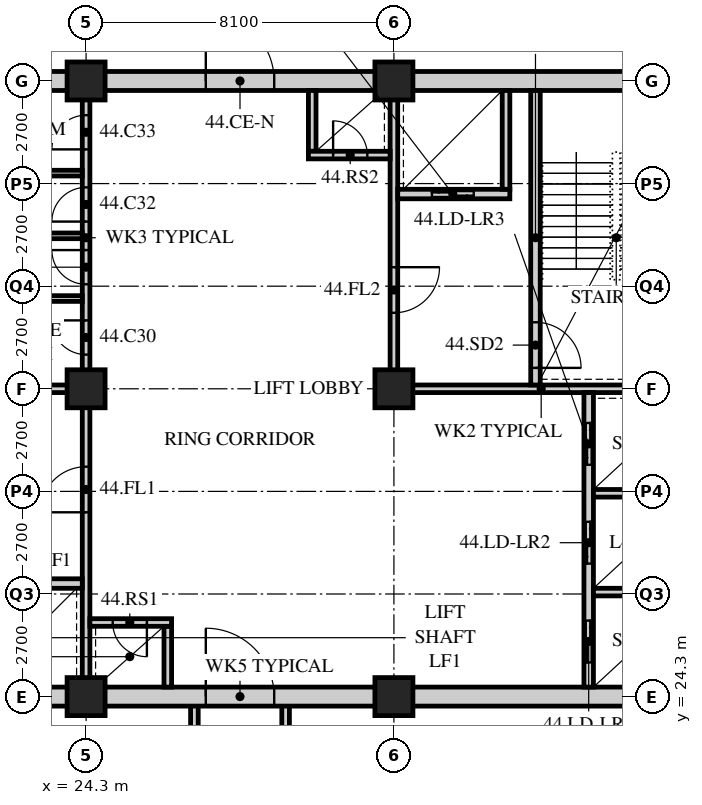
"""IFC4 building model, lengths in metres.
Left out: names, types, materials, properties, quantities, classifications, styles, units other than length and angle.
Written with IfcOpenShell. Run it as: python <this file> out.ifc"""

import sys

from ifc_helpers import new_model, si_unit, direction, frame, frame_2d, origin, origin_2d, place, context, subcontext, project, spatial, rectangle, hollow_rectangle, extrude, element, fill, save


model = new_model("IFC4")
c1 = context("Model", 3, precision=1e-05, world=origin(), true_north=direction((0.0, 1.0)))
c2 = subcontext(c1, "Body", "Model", "MODEL_VIEW")
j1 = project(units=[si_unit("LENGTHUNIT", "METRE"), si_unit("PLANEANGLEUNIT", "RADIAN")], contexts=[c1])
p1 = place(None, origin())
s1 = spatial("IfcSite", under=j1, at=p1, CompositionType="ELEMENT")
p2 = place(p1, origin())
s2 = spatial("IfcBuilding", under=s1, at=p2, CompositionType="ELEMENT")
p3 = place(p2, frame((0.0, 0.0, 174.0)))
s3 = spatial("IfcBuildingStorey", under=s2, at=p3, CompositionType="ELEMENT", Elevation=174.0)
for number, where, z_axis, x_axis in (
    (1, (24.3, 24.3, 0.0), (0.0, 0.0, 1.0), (1.0, 0.0, 0.0)),
    (2, (24.3, 32.4, 0.0), (0.0, 0.0, 1.0), (1.0, 0.0, 0.0)),
    (3, (24.3, 40.5, 0.0), (0.0, 0.0, 1.0), (1.0, 0.0, 0.0)),
    (4, (32.4, 24.3, 0.0), (0.0, 0.0, 1.0), (1.0, 0.0, 0.0)),
    (5, (32.4, 32.4, 0.0), (0.0, 0.0, 1.0), (1.0, 0.0, 0.0)),
    (6, (32.4, 40.5, 0.0), (0.0, 0.0, 1.0), (1.0, 0.0, 0.0)),
):
    element("IfcColumn", number, at=place(p3, frame(where, z_axis=z_axis, x_axis=x_axis)), inside=s3, PredefinedType="COLUMN", context=c2, shape_type="SweptSolid", body=[
        extrude(hollow_rectangle(XDim=1.0, YDim=1.0, WallThickness=0.1, at=origin_2d()), origin(), (0.0, 0.0, 1.0), 3.6),
    ])
for number, where, z_axis, x_axis in (
    (7, (27.15, 20.7, 0.0), (0.0, 0.0, 1.0), (0.0, 1.0, 0.0)),
    (8, (29.55, 20.7, 0.0), (0.0, 0.0, 1.0), (0.0, 1.0, 0.0)),
):
    element("IfcWall", number, at=place(p3, frame(where, z_axis=z_axis, x_axis=x_axis)), inside=s3, PredefinedType="SOLIDWALL", context=c2, shape_type="SweptSolid", body=[
        extrude(rectangle(XDim=3.6, YDim=0.2, at=frame_2d((1.8, 0.0))), origin(), (0.0, 0.0, 1.0), 3.39),
    ])
p4 = place(p3, frame((15.95, 24.3, 0.0), z_axis=(0.0, 0.0, 1.0), x_axis=(1.0, 0.0, 0.0)))
e9 = element("IfcWall", 9, at=p4, inside=s3, PredefinedType="SOLIDWALL", context=c2, shape_type="SweptSolid", body=[
    extrude(rectangle(XDim=24.8, YDim=0.5, at=frame_2d((12.4, 0.0))), origin(), (0.0, 0.0, 1.0), 2.74),
])
p5 = place(p4, frame((11.5, 0.0, 0.0)))
e10 = element("IfcOpeningElement", 10, at=p5, cuts=e9, PredefinedType="OPENING", context=c2, shape_type="SweptSolid", body=[
    extrude(rectangle(XDim=1.8, YDim=2.4, at=frame_2d((0.9, 1.2))), frame((0.0, 0.26, 0.0), z_axis=(0.0, -1.0, 0.0), x_axis=(1.0, 0.0, 0.0)), (0.0, 0.0, 1.0), 0.52),
])
p6 = place(p3, frame((15.95, 40.5, 0.0), z_axis=(0.0, 0.0, 1.0), x_axis=(1.0, 0.0, 0.0)))
e11 = element("IfcWall", 11, at=p6, inside=s3, PredefinedType="SOLIDWALL", context=c2, shape_type="SweptSolid", body=[
    extrude(rectangle(XDim=24.8, YDim=0.5, at=frame_2d((12.4, 0.0))), origin(), (0.0, 0.0, 1.0), 2.74),
])
p7 = place(p6, frame((11.5, 0.0, 0.0)))
e12 = element("IfcOpeningElement", 12, at=p7, cuts=e11, PredefinedType="OPENING", context=c2, shape_type="SweptSolid", body=[
    extrude(rectangle(XDim=1.8, YDim=2.4, at=frame_2d((0.9, 1.2))), frame((0.0, 0.26, 0.0), z_axis=(0.0, -1.0, 0.0), x_axis=(1.0, 0.0, 0.0)), (0.0, 0.0, 1.0), 0.52),
])
p8 = place(p3, frame((16.45, 32.4, 0.0), z_axis=(0.0, 0.0, 1.0), x_axis=(1.0, 0.0, 0.0)))
e13 = element("IfcWall", 13, at=p8, inside=s3, PredefinedType="SOLIDWALL", context=c2, shape_type="SweptSolid", body=[
    extrude(rectangle(XDim=7.95, YDim=0.2, at=frame_2d((3.975, 0.0))), origin(), (0.0, 0.0, 1.0), 2.778),
])
p9 = place(p3, frame((24.3, 24.55, 0.0), z_axis=(0.0, 0.0, 1.0), x_axis=(0.0, 1.0, 0.0)))
e14 = element("IfcWall", 14, at=p9, inside=s3, PredefinedType="SOLIDWALL", context=c2, shape_type="SweptSolid", body=[
    extrude(rectangle(XDim=7.75, YDim=0.2, at=frame_2d((3.875, 0.0))), origin(), (0.0, 0.0, 1.0), 2.778),
])
p10 = place(p9, frame((4.6, 0.0, 0.0)))
e15 = element("IfcOpeningElement", 15, at=p10, cuts=e14, PredefinedType="OPENING", context=c2, shape_type="SweptSolid", body=[
    extrude(rectangle(XDim=1.2, YDim=2.1, at=frame_2d((0.6, 1.05))), frame((0.0, 0.11, 0.0), z_axis=(0.0, -1.0, 0.0), x_axis=(1.0, 0.0, 0.0)), (0.0, 0.0, 1.0), 0.22),
])
p11 = place(p3, frame((21.25, 27.275, 0.0), z_axis=(0.0, 0.0, 1.0), x_axis=(1.0, 0.0, 0.0)))
e16 = element("IfcWall", 16, at=p11, inside=s3, PredefinedType="SOLIDWALL", context=c2, shape_type="SweptSolid", body=[
    extrude(rectangle(XDim=2.95, YDim=0.25, at=frame_2d((1.475, 0.0))), origin(), (0.0, 0.0, 1.0), 3.39),
])
p12 = place(p11, frame((0.95, 0.0, 0.0)))
e17 = element("IfcOpeningElement", 17, at=p12, cuts=e16, PredefinedType="OPENING", context=c2, shape_type="SweptSolid", body=[
    extrude(rectangle(XDim=1.1, YDim=2.4, at=frame_2d((0.55, 1.2))), frame((0.0, 0.135, 0.0), z_axis=(0.0, -1.0, 0.0), x_axis=(1.0, 0.0, 0.0)), (0.0, 0.0, 1.0), 0.27),
])
p13 = place(p3, frame((26.45, 24.55, 0.0), z_axis=(0.0, 0.0, 1.0), x_axis=(0.0, 1.0, 0.0)))
e18 = element("IfcWall", 18, at=p13, inside=s3, PredefinedType="SOLIDWALL", context=c2, shape_type="SweptSolid", body=[
    extrude(rectangle(XDim=1.6, YDim=0.2, at=frame_2d((0.8, 0.0))), origin(), (0.0, 0.0, 1.0), 3.39),
])
p14 = place(p3, frame((24.4, 26.25, 0.0), z_axis=(0.0, 0.0, 1.0), x_axis=(1.0, 0.0, 0.0)))
e19 = element("IfcWall", 19, at=p14, inside=s3, PredefinedType="SOLIDWALL", context=c2, shape_type="SweptSolid", body=[
    extrude(rectangle(XDim=2.15, YDim=0.2, at=frame_2d((1.075, 0.0))), origin(), (0.0, 0.0, 1.0), 3.39),
])
p15 = place(p14, frame((0.6, 0.0, 0.0)))
e20 = element("IfcOpeningElement", 20, at=p15, cuts=e19, PredefinedType="OPENING", context=c2, shape_type="SweptSolid", body=[
    extrude(rectangle(XDim=0.9, YDim=2.1, at=frame_2d((0.45, 1.05))), frame((0.0, 0.11, 0.0), z_axis=(0.0, -1.0, 0.0), x_axis=(1.0, 0.0, 0.0)), (0.0, 0.0, 1.0), 0.22),
])
p16 = place(p3, frame((32.3, 32.4, 0.0), z_axis=(0.0, 0.0, 1.0), x_axis=(1.0, 0.0, 0.0)))
e21 = element("IfcWall", 21, at=p16, inside=s3, PredefinedType="SOLIDWALL", context=c2, shape_type="SweptSolid", body=[
    extrude(rectangle(XDim=7.95, YDim=0.2, at=frame_2d((3.975, 0.0))), origin(), (0.0, 0.0, 1.0), 2.778),
])
p17 = place(p3, frame((32.4, 32.5, 0.0), z_axis=(0.0, 0.0, 1.0), x_axis=(0.0, 1.0, 0.0)))
e22 = element("IfcWall", 22, at=p17, inside=s3, PredefinedType="SOLIDWALL", context=c2, shape_type="SweptSolid", body=[
    extrude(rectangle(XDim=7.75, YDim=0.2, at=frame_2d((3.875, 0.0))), origin(), (0.0, 0.0, 1.0), 2.778),
])
p18 = place(p17, frame((1.9, 0.0, 0.0)))
e23 = element("IfcOpeningElement", 23, at=p18, cuts=e22, PredefinedType="OPENING", context=c2, shape_type="SweptSolid", body=[
    extrude(rectangle(XDim=1.2, YDim=2.1, at=frame_2d((0.6, 1.05))), frame((0.0, 0.11, 0.0), z_axis=(0.0, -1.0, 0.0), x_axis=(1.0, 0.0, 0.0)), (0.0, 0.0, 1.0), 0.22),
])
p19 = place(p3, frame((37.525, 24.55, 0.0), z_axis=(0.0, 0.0, 1.0), x_axis=(0.0, 1.0, 0.0)))
e24 = element("IfcWall", 24, at=p19, inside=s3, PredefinedType="SOLIDWALL", context=c2, shape_type="SweptSolid", body=[
    extrude(rectangle(XDim=7.75, YDim=0.25, at=frame_2d((3.875, 0.0))), origin(), (0.0, 0.0, 1.0), 3.39),
])
p20 = place(p19, frame((0.65, 0.0, 0.0)))
e25 = element("IfcOpeningElement", 25, at=p20, cuts=e24, PredefinedType="OPENING", context=c2, shape_type="SweptSolid", body=[
    extrude(rectangle(XDim=1.1, YDim=2.4, at=frame_2d((0.55, 1.2))), frame((0.0, 0.135, 0.0), z_axis=(0.0, -1.0, 0.0), x_axis=(1.0, 0.0, 0.0)), (0.0, 0.0, 1.0), 0.27),
])
p21 = place(p19, frame((3.25, 0.0, 0.0)))
e26 = element("IfcOpeningElement", 26, at=p21, cuts=e24, PredefinedType="OPENING", context=c2, shape_type="SweptSolid", body=[
    extrude(rectangle(XDim=1.1, YDim=2.4, at=frame_2d((0.55, 1.2))), frame((0.0, 0.135, 0.0), z_axis=(0.0, -1.0, 0.0), x_axis=(1.0, 0.0, 0.0)), (0.0, 0.0, 1.0), 0.27),
])
p22 = place(p19, frame((5.85, 0.0, 0.0)))
e27 = element("IfcOpeningElement", 27, at=p22, cuts=e24, PredefinedType="OPENING", context=c2, shape_type="SweptSolid", body=[
    extrude(rectangle(XDim=1.1, YDim=2.4, at=frame_2d((0.55, 1.2))), frame((0.0, 0.135, 0.0), z_axis=(0.0, -1.0, 0.0), x_axis=(1.0, 0.0, 0.0)), (0.0, 0.0, 1.0), 0.27),
])
for number, where, z_axis, x_axis in (
    (28, (37.65, 27.05, 0.0), (0.0, 0.0, 1.0), (1.0, 0.0, 0.0)),
    (29, (37.65, 29.65, 0.0), (0.0, 0.0, 1.0), (1.0, 0.0, 0.0)),
):
    element("IfcWall", number, at=place(p3, frame(where, z_axis=z_axis, x_axis=x_axis)), inside=s3, PredefinedType="SOLIDWALL", context=c2, shape_type="SweptSolid", body=[
        extrude(rectangle(XDim=2.6, YDim=0.2, at=frame_2d((1.3, 0.0))), origin(), (0.0, 0.0, 1.0), 3.39),
    ])
p23 = place(p3, frame((36.125, 32.5, 0.0), z_axis=(0.0, 0.0, 1.0), x_axis=(0.0, 1.0, 0.0)))
e30 = element("IfcWall", 30, at=p23, inside=s3, PredefinedType="SOLIDWALL", context=c2, shape_type="SweptSolid", body=[
    extrude(rectangle(XDim=7.75, YDim=0.25, at=frame_2d((3.875, 0.0))), origin(), (0.0, 0.0, 1.0), 3.39),
])
p24 = place(p23, frame((0.45, 0.0, 0.0)))
e31 = element("IfcOpeningElement", 31, at=p24, cuts=e30, PredefinedType="OPENING", context=c2, shape_type="SweptSolid", body=[
    extrude(rectangle(XDim=1.2, YDim=2.1, at=frame_2d((0.6, 1.05))), frame((0.0, 0.135, 0.0), z_axis=(0.0, -1.0, 0.0), x_axis=(1.0, 0.0, 0.0)), (0.0, 0.0, 1.0), 0.27),
])
p25 = place(p3, frame((32.5, 37.525, 0.0), z_axis=(0.0, 0.0, 1.0), x_axis=(1.0, 0.0, 0.0)))
e32 = element("IfcWall", 32, at=p25, inside=s3, PredefinedType="SOLIDWALL", context=c2, shape_type="SweptSolid", body=[
    extrude(rectangle(XDim=2.95, YDim=0.25, at=frame_2d((1.475, 0.0))), origin(), (0.0, 0.0, 1.0), 3.39),
])
p26 = place(p25, frame((0.9, 0.0, 0.0)))
e33 = element("IfcOpeningElement", 33, at=p26, cuts=e32, PredefinedType="OPENING", context=c2, shape_type="SweptSolid", body=[
    extrude(rectangle(XDim=1.1, YDim=2.4, at=frame_2d((0.55, 1.2))), frame((0.0, 0.135, 0.0), z_axis=(0.0, -1.0, 0.0), x_axis=(1.0, 0.0, 0.0)), (0.0, 0.0, 1.0), 0.27),
])
p27 = place(p3, frame((35.35, 37.65, 0.0), z_axis=(0.0, 0.0, 1.0), x_axis=(0.0, 1.0, 0.0)))
e34 = element("IfcWall", 34, at=p27, inside=s3, PredefinedType="SOLIDWALL", context=c2, shape_type="SweptSolid", body=[
    extrude(rectangle(XDim=2.6, YDim=0.2, at=frame_2d((1.3, 0.0))), origin(), (0.0, 0.0, 1.0), 3.39),
])
p28 = place(p3, frame((30.25, 38.65, 0.0), z_axis=(0.0, 0.0, 1.0), x_axis=(0.0, 1.0, 0.0)))
e35 = element("IfcWall", 35, at=p28, inside=s3, PredefinedType="SOLIDWALL", context=c2, shape_type="SweptSolid", body=[
    extrude(rectangle(XDim=1.6, YDim=0.2, at=frame_2d((0.8, 0.0))), origin(), (0.0, 0.0, 1.0), 3.39),
])
p29 = place(p3, frame((30.15, 38.55, 0.0), z_axis=(0.0, 0.0, 1.0), x_axis=(1.0, 0.0, 0.0)))
e36 = element("IfcWall", 36, at=p29, inside=s3, PredefinedType="SOLIDWALL", context=c2, shape_type="SweptSolid", body=[
    extrude(rectangle(XDim=2.15, YDim=0.2, at=frame_2d((1.075, 0.0))), origin(), (0.0, 0.0, 1.0), 3.39),
])
p30 = place(p29, frame((0.65, 0.0, 0.0)))
e37 = element("IfcOpeningElement", 37, at=p30, cuts=e36, PredefinedType="OPENING", context=c2, shape_type="SweptSolid", body=[
    extrude(rectangle(XDim=0.9, YDim=2.1, at=frame_2d((0.45, 1.05))), frame((0.0, 0.11, 0.0), z_axis=(0.0, -1.0, 0.0), x_axis=(1.0, 0.0, 0.0)), (0.0, 0.0, 1.0), 0.22),
])
p31 = place(p3, frame((24.3, 32.5, 0.0), z_axis=(0.0, 0.0, 1.0), x_axis=(0.0, 1.0, 0.0)))
e38 = element("IfcWall", 38, at=p31, inside=s3, PredefinedType="PARTITIONING", context=c2, shape_type="SweptSolid", body=[
    extrude(rectangle(XDim=7.75, YDim=0.2, at=frame_2d((3.875, 0.0))), origin(), (0.0, 0.0, 1.0), 2.778),
])
p32 = place(p31, frame((0.8, 0.0, 0.0)))
e39 = element("IfcOpeningElement", 39, at=p32, cuts=e38, PredefinedType="OPENING", context=c2, shape_type="SweptSolid", body=[
    extrude(rectangle(XDim=0.9, YDim=2.1, at=frame_2d((0.45, 1.05))), frame((0.0, 0.11, 0.0), z_axis=(0.0, -1.0, 0.0), x_axis=(1.0, 0.0, 0.0)), (0.0, 0.0, 1.0), 0.22),
])
p33 = place(p31, frame((2.65, 0.0, 0.0)))
e40 = element("IfcOpeningElement", 40, at=p33, cuts=e38, PredefinedType="OPENING", context=c2, shape_type="SweptSolid", body=[
    extrude(rectangle(XDim=0.9, YDim=2.1, at=frame_2d((0.45, 1.05))), frame((0.0, 0.11, 0.0), z_axis=(0.0, -1.0, 0.0), x_axis=(1.0, 0.0, 0.0)), (0.0, 0.0, 1.0), 0.22),
])
p34 = place(p31, frame((4.3, 0.0, 0.0)))
e41 = element("IfcOpeningElement", 41, at=p34, cuts=e38, PredefinedType="OPENING", context=c2, shape_type="SweptSolid", body=[
    extrude(rectangle(XDim=0.9, YDim=2.1, at=frame_2d((0.45, 1.05))), frame((0.0, 0.11, 0.0), z_axis=(0.0, -1.0, 0.0), x_axis=(1.0, 0.0, 0.0)), (0.0, 0.0, 1.0), 0.22),
])
p35 = place(p31, frame((6.2, 0.0, 0.0)))
e42 = element("IfcOpeningElement", 42, at=p35, cuts=e38, PredefinedType="OPENING", context=c2, shape_type="SweptSolid", body=[
    extrude(rectangle(XDim=0.9, YDim=2.1, at=frame_2d((0.45, 1.05))), frame((0.0, 0.11, 0.0), z_axis=(0.0, -1.0, 0.0), x_axis=(1.0, 0.0, 0.0)), (0.0, 0.0, 1.0), 0.22),
])
for number, where, z_axis, x_axis in (
    (43, (21.05, 34.775, 0.0), (0.0, 0.0, 1.0), (1.0, 0.0, 0.0)),
    (44, (21.05, 36.425, 0.0), (0.0, 0.0, 1.0), (1.0, 0.0, 0.0)),
):
    element("IfcWall", number, at=place(p3, frame(where, z_axis=z_axis, x_axis=x_axis)), inside=s3, PredefinedType="PARTITIONING", context=c2, shape_type="SweptSolid", body=[
        extrude(rectangle(XDim=3.15, YDim=0.15, at=frame_2d((1.575, 0.0))), origin(), (0.0, 0.0, 1.0), 3.39),
    ])
p36 = place(p3, frame((21.2, 38.075, 0.0), z_axis=(0.0, 0.0, 1.0), x_axis=(1.0, 0.0, 0.0)))
e45 = element("IfcWall", 45, at=p36, inside=s3, PredefinedType="PARTITIONING", context=c2, shape_type="SweptSolid", body=[
    extrude(rectangle(XDim=3.0, YDim=0.15, at=frame_2d((1.5, 0.0))), origin(), (0.0, 0.0, 1.0), 3.39),
])
p37 = place(p32, origin())
e46 = element("IfcDoor", 46, at=p37, inside=s3, OperationType="SINGLE_SWING_RIGHT", PredefinedType="DOOR", context=c2, shape_type="SweptSolid", body=[
    extrude(rectangle(XDim=0.9, YDim=2.1, at=frame_2d((0.45, 1.05))), frame((0.0, 0.025, 0.0), z_axis=(0.0, -1.0, 0.0), x_axis=(1.0, 0.0, 0.0)), (0.0, 0.0, 1.0), 0.05),
])
fill(e39, e46)
p38 = place(p33, origin())
e47 = element("IfcDoor", 47, at=p38, inside=s3, OperationType="SINGLE_SWING_RIGHT", PredefinedType="DOOR", context=c2, shape_type="SweptSolid", body=[
    extrude(rectangle(XDim=0.9, YDim=2.1, at=frame_2d((0.45, 1.05))), frame((0.0, 0.025, 0.0), z_axis=(0.0, -1.0, 0.0), x_axis=(1.0, 0.0, 0.0)), (0.0, 0.0, 1.0), 0.05),
])
fill(e40, e47)
p39 = place(p34, origin())
e48 = element("IfcDoor", 48, at=p39, inside=s3, OperationType="SINGLE_SWING_LEFT", PredefinedType="DOOR", context=c2, shape_type="SweptSolid", body=[
    extrude(rectangle(XDim=0.9, YDim=2.1, at=frame_2d((0.45, 1.05))), frame((0.0, 0.025, 0.0), z_axis=(0.0, -1.0, 0.0), x_axis=(1.0, 0.0, 0.0)), (0.0, 0.0, 1.0), 0.05),
])
fill(e41, e48)
p40 = place(p35, origin())
e49 = element("IfcDoor", 49, at=p40, inside=s3, OperationType="SINGLE_SWING_LEFT", PredefinedType="DOOR", context=c2, shape_type="SweptSolid", body=[
    extrude(rectangle(XDim=0.9, YDim=2.1, at=frame_2d((0.45, 1.05))), frame((0.0, 0.025, 0.0), z_axis=(0.0, -1.0, 0.0), x_axis=(1.0, 0.0, 0.0)), (0.0, 0.0, 1.0), 0.05),
])
fill(e42, e49)
p41 = place(p10, origin())
e50 = element("IfcDoor", 50, at=p41, inside=s3, OperationType="SINGLE_SWING_LEFT", PredefinedType="DOOR", context=c2, shape_type="SweptSolid", body=[
    extrude(rectangle(XDim=1.2, YDim=2.1, at=frame_2d((0.6, 1.05))), frame((0.0, 0.025, 0.0), z_axis=(0.0, -1.0, 0.0), x_axis=(1.0, 0.0, 0.0)), (0.0, 0.0, 1.0), 0.05),
])
fill(e15, e50)
p42 = place(p15, origin())
e51 = element("IfcDoor", 51, at=p42, inside=s3, OperationType="SINGLE_SWING_LEFT", PredefinedType="DOOR", context=c2, shape_type="SweptSolid", body=[
    extrude(rectangle(XDim=0.9, YDim=2.1, at=frame_2d((0.45, 1.05))), frame((0.0, 0.025, 0.0), z_axis=(0.0, -1.0, 0.0), x_axis=(1.0, 0.0, 0.0)), (0.0, 0.0, 1.0), 0.05),
])
fill(e20, e51)
p43 = place(p24, origin())
e52 = element("IfcDoor", 52, at=p43, inside=s3, OperationType="SINGLE_SWING_RIGHT", PredefinedType="DOOR", context=c2, shape_type="SweptSolid", body=[
    extrude(rectangle(XDim=1.2, YDim=2.1, at=frame_2d((0.6, 1.05))), frame((0.0, 0.025, 0.0), z_axis=(0.0, -1.0, 0.0), x_axis=(1.0, 0.0, 0.0)), (0.0, 0.0, 1.0), 0.05),
])
fill(e31, e52)
p44 = place(p18, origin())
e53 = element("IfcDoor", 53, at=p44, inside=s3, OperationType="SINGLE_SWING_LEFT", PredefinedType="DOOR", context=c2, shape_type="SweptSolid", body=[
    extrude(rectangle(XDim=1.2, YDim=2.1, at=frame_2d((0.6, 1.05))), frame((0.0, 0.025, 0.0), z_axis=(0.0, -1.0, 0.0), x_axis=(1.0, 0.0, 0.0)), (0.0, 0.0, 1.0), 0.05),
])
fill(e23, e53)
p45 = place(p30, origin())
e54 = element("IfcDoor", 54, at=p45, inside=s3, OperationType="SINGLE_SWING_LEFT", PredefinedType="DOOR", context=c2, shape_type="SweptSolid", body=[
    extrude(rectangle(XDim=0.9, YDim=2.1, at=frame_2d((0.45, 1.05))), frame((0.0, 0.025, 0.0), z_axis=(0.0, -1.0, 0.0), x_axis=(1.0, 0.0, 0.0)), (0.0, 0.0, 1.0), 0.05),
])
fill(e37, e54)
p46 = place(p20, origin())
e55 = element("IfcDoor", 55, at=p46, inside=s3, OperationType="DOUBLE_DOOR_SLIDING", PredefinedType="DOOR", context=c2, shape_type="SweptSolid", body=[
    extrude(rectangle(XDim=1.1, YDim=2.4, at=frame_2d((0.55, 1.2))), frame((0.0, 0.025, 0.0), z_axis=(0.0, -1.0, 0.0), x_axis=(1.0, 0.0, 0.0)), (0.0, 0.0, 1.0), 0.05),
])
fill(e25, e55)
p47 = place(p21, origin())
e56 = element("IfcDoor", 56, at=p47, inside=s3, OperationType="DOUBLE_DOOR_SLIDING", PredefinedType="DOOR", context=c2, shape_type="SweptSolid", body=[
    extrude(rectangle(XDim=1.1, YDim=2.4, at=frame_2d((0.55, 1.2))), frame((0.0, 0.025, 0.0), z_axis=(0.0, -1.0, 0.0), x_axis=(1.0, 0.0, 0.0)), (0.0, 0.0, 1.0), 0.05),
])
fill(e26, e56)
p48 = place(p22, origin())
e57 = element("IfcDoor", 57, at=p48, inside=s3, OperationType="DOUBLE_DOOR_SLIDING", PredefinedType="DOOR", context=c2, shape_type="SweptSolid", body=[
    extrude(rectangle(XDim=1.1, YDim=2.4, at=frame_2d((0.55, 1.2))), frame((0.0, 0.025, 0.0), z_axis=(0.0, -1.0, 0.0), x_axis=(1.0, 0.0, 0.0)), (0.0, 0.0, 1.0), 0.05),
])
fill(e27, e57)
p49 = place(p26, origin())
e58 = element("IfcDoor", 58, at=p49, inside=s3, OperationType="DOUBLE_DOOR_SLIDING", PredefinedType="DOOR", context=c2, shape_type="SweptSolid", body=[
    extrude(rectangle(XDim=1.1, YDim=2.4, at=frame_2d((0.55, 1.2))), frame((0.0, 0.025, 0.0), z_axis=(0.0, -1.0, 0.0), x_axis=(1.0, 0.0, 0.0)), (0.0, 0.0, 1.0), 0.05),
])
fill(e33, e58)
p50 = place(p5, origin())
e59 = element("IfcDoor", 59, at=p50, inside=s3, OperationType="DOUBLE_DOOR_SINGLE_SWING", PredefinedType="DOOR", context=c2, shape_type="SweptSolid", body=[
    extrude(rectangle(XDim=1.8, YDim=2.4, at=frame_2d((0.9, 1.2))), frame((0.0, 0.025, 0.0), z_axis=(0.0, -1.0, 0.0), x_axis=(1.0, 0.0, 0.0)), (0.0, 0.0, 1.0), 0.05),
])
fill(e10, e59)
p51 = place(p7, origin())
e60 = element("IfcDoor", 60, at=p51, inside=s3, OperationType="DOUBLE_DOOR_SINGLE_SWING", PredefinedType="DOOR", context=c2, shape_type="SweptSolid", body=[
    extrude(rectangle(XDim=1.8, YDim=2.4, at=frame_2d((0.9, 1.2))), frame((0.0, 0.025, 0.0), z_axis=(0.0, -1.0, 0.0), x_axis=(1.0, 0.0, 0.0)), (0.0, 0.0, 1.0), 0.05),
])
fill(e12, e60)
save(model, sys.argv[1])
